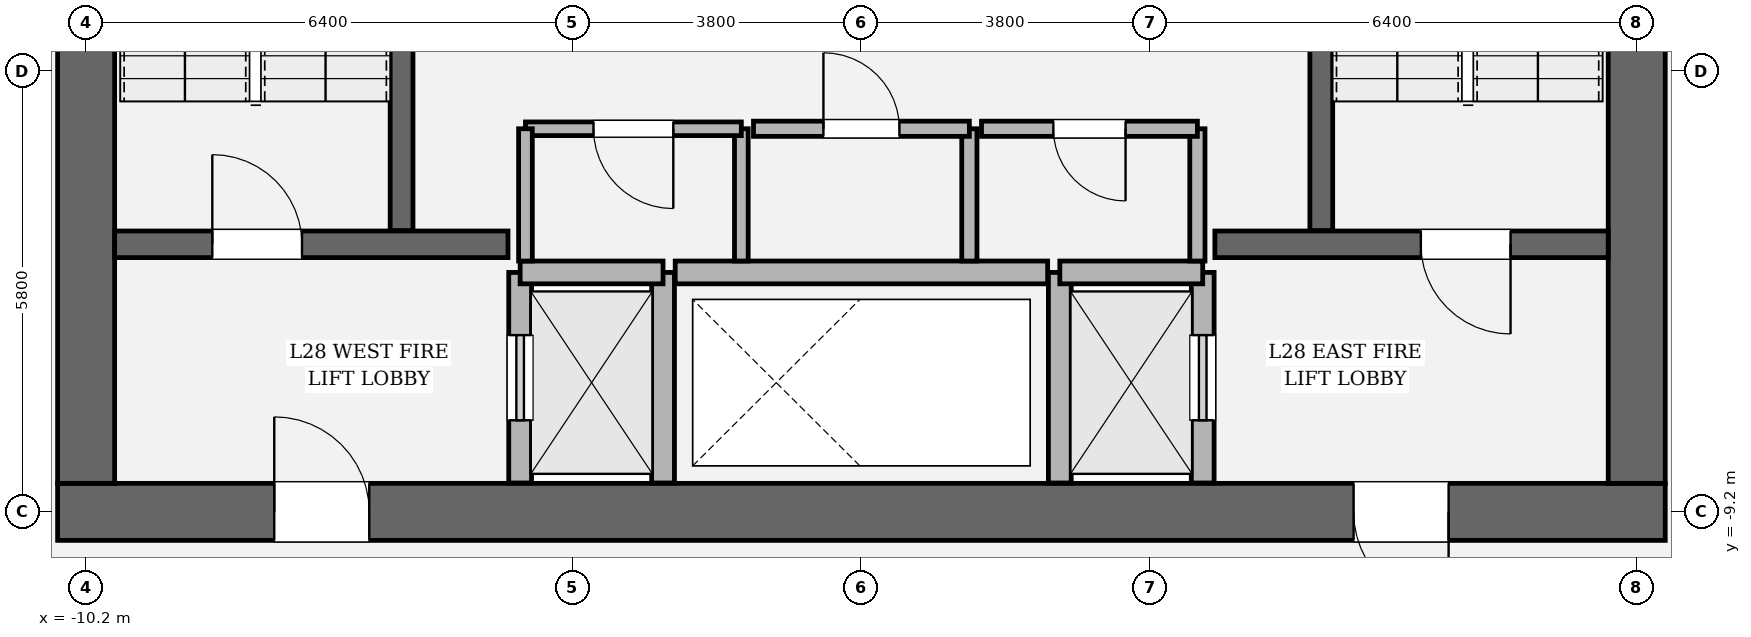
"""IFC4 building model, lengths in metres.
Left out: names, types, materials, properties, quantities, classifications, styles, units other than length and angle.
Written with IfcOpenShell. Run it as: python <this file> out.ifc"""

import sys

from ifc_helpers import new_model, si_unit, direction, frame, frame_2d, origin, place, context, subcontext, project, spatial, rectangle, extrude, element, fill, save


model = new_model("IFC4")
c1 = context("Model", 3, precision=1e-05, world=origin(), true_north=direction((0.0, 1.0)))
c2 = subcontext(c1, "Body", "Model", "MODEL_VIEW")
j1 = project(units=[si_unit("LENGTHUNIT", "METRE"), si_unit("PLANEANGLEUNIT", "RADIAN")], contexts=[c1])
p1 = place(None, origin())
s1 = spatial("IfcSite", under=j1, at=p1, CompositionType="ELEMENT")
p2 = place(p1, origin())
s2 = spatial("IfcBuilding", under=s1, at=p2, CompositionType="ELEMENT")
p3 = place(p2, frame((0.0, 0.0, 121.35)))
s3 = spatial("IfcBuildingStorey", under=s2, at=p3, CompositionType="ELEMENT", Elevation=121.35)
p4 = place(p3, frame((10.575, -9.2, 0.0), z_axis=(0.0, 0.0, 1.0), x_axis=(-1.0, 0.0, 0.0)))
e1 = element("IfcWall", 1, at=p4, inside=s3, PredefinedType="SHEAR", context=c2, shape_type="SweptSolid", body=[
    extrude(rectangle(XDim=21.15, YDim=0.75, at=frame_2d((10.575, 0.0))), origin(), (0.0, 0.0, 1.0), 4.05),
])
p5 = place(p4, frame((2.85, 0.0, 0.0)))
e2 = element("IfcOpeningElement", 2, at=p5, cuts=e1, PredefinedType="OPENING", context=c2, shape_type="SweptSolid", body=[
    extrude(rectangle(XDim=1.25, YDim=2.25, at=frame_2d((0.625, 1.125))), frame((0.0, 0.385, 0.0), z_axis=(0.0, -1.0, 0.0), x_axis=(1.0, 0.0, 0.0)), (0.0, 0.0, 1.0), 0.77),
])
p6 = place(p4, frame((17.05, 0.0, 0.0)))
e3 = element("IfcOpeningElement", 3, at=p6, cuts=e1, PredefinedType="OPENING", context=c2, shape_type="SweptSolid", body=[
    extrude(rectangle(XDim=1.25, YDim=2.25, at=frame_2d((0.625, 1.125))), frame((0.0, 0.385, 0.0), z_axis=(0.0, -1.0, 0.0), x_axis=(1.0, 0.0, 0.0)), (0.0, 0.0, 1.0), 0.77),
])
p7 = place(p3, frame((-10.2, -8.825, 0.0), z_axis=(0.0, 0.0, 1.0), x_axis=(0.0, 1.0, 0.0)))
e4 = element("IfcWall", 4, at=p7, inside=s3, PredefinedType="SHEAR", context=c2, shape_type="SweptSolid", body=[
    extrude(rectangle(XDim=17.65, YDim=0.75, at=frame_2d((8.825, 0.0))), origin(), (0.0, 0.0, 1.0), 4.05),
])
p8 = place(p7, frame((12.615, 0.0, 0.0)))
e5 = element("IfcOpeningElement", 5, at=p8, cuts=e4, PredefinedType="OPENING", context=c2, shape_type="SweptSolid", body=[
    extrude(rectangle(XDim=1.18, YDim=2.2, at=frame_2d((0.59, 1.1))), frame((0.0, 0.385, 0.0), z_axis=(0.0, -1.0, 0.0), x_axis=(1.0, 0.0, 0.0)), (0.0, 0.0, 1.0), 0.77),
])
p9 = place(p3, frame((10.2, 8.825, 0.0), z_axis=(0.0, 0.0, 1.0), x_axis=(0.0, -1.0, 0.0)))
e6 = element("IfcWall", 6, at=p9, inside=s3, PredefinedType="SHEAR", context=c2, shape_type="SweptSolid", body=[
    extrude(rectangle(XDim=17.65, YDim=0.75, at=frame_2d((8.825, 0.0))), origin(), (0.0, 0.0, 1.0), 4.05),
])
p10 = place(p9, frame((3.855, 0.0, 0.0)))
e7 = element("IfcOpeningElement", 7, at=p10, cuts=e6, PredefinedType="OPENING", context=c2, shape_type="SweptSolid", body=[
    extrude(rectangle(XDim=1.18, YDim=2.2, at=frame_2d((0.59, 1.1))), frame((0.0, 0.385, 0.0), z_axis=(0.0, -1.0, 0.0), x_axis=(1.0, 0.0, 0.0)), (0.0, 0.0, 1.0), 0.77),
])
for number, where, z_axis, x_axis in (
    (8, (-6.05, -5.5, 0.0), (0.0, 0.0, 1.0), (0.0, 1.0, 0.0)),
    (9, (6.05, 3.45, 0.0), (0.0, 0.0, 1.0), (0.0, -1.0, 0.0)),
):
    element("IfcWall", number, at=place(p3, frame(where, z_axis=z_axis, x_axis=x_axis)), inside=s3, PredefinedType="SOLIDWALL", context=c2, shape_type="SweptSolid", body=[
        extrude(rectangle(XDim=8.95, YDim=0.3, at=frame_2d((4.475, 0.0))), origin(), (0.0, 0.0, 1.0), 4.05),
    ])
p11 = place(p3, frame((-9.825, -5.68, 0.0), z_axis=(0.0, 0.0, 1.0), x_axis=(1.0, 0.0, 0.0)))
e10 = element("IfcWall", 10, at=p11, inside=s3, PredefinedType="SOLIDWALL", context=c2, shape_type="SweptSolid", body=[
    extrude(rectangle(XDim=5.175, YDim=0.35, at=frame_2d((2.587, 0.0))), origin(), (0.0, 0.0, 1.0), 4.05),
])
p12 = place(p11, frame((1.285, 0.0, 0.0)))
e11 = element("IfcOpeningElement", 11, at=p12, cuts=e10, PredefinedType="OPENING", context=c2, shape_type="SweptSolid", body=[
    extrude(rectangle(XDim=1.18, YDim=2.2, at=frame_2d((0.59, 1.1))), frame((0.0, 0.185, 0.0), z_axis=(0.0, -1.0, 0.0), x_axis=(1.0, 0.0, 0.0)), (0.0, 0.0, 1.0), 0.37),
])
p13 = place(p3, frame((4.65, -5.68, 0.0), z_axis=(0.0, 0.0, 1.0), x_axis=(1.0, 0.0, 0.0)))
e12 = element("IfcWall", 12, at=p13, inside=s3, PredefinedType="SOLIDWALL", context=c2, shape_type="SweptSolid", body=[
    extrude(rectangle(XDim=5.175, YDim=0.35, at=frame_2d((2.587, 0.0))), origin(), (0.0, 0.0, 1.0), 4.05),
])
p14 = place(p13, frame((2.71, 0.0, 0.0)))
e13 = element("IfcOpeningElement", 13, at=p14, cuts=e12, PredefinedType="OPENING", context=c2, shape_type="SweptSolid", body=[
    extrude(rectangle(XDim=1.18, YDim=2.2, at=frame_2d((0.59, 1.1))), frame((0.0, 0.185, 0.0), z_axis=(0.0, -1.0, 0.0), x_axis=(1.0, 0.0, 0.0)), (0.0, 0.0, 1.0), 0.37),
])
p15 = place(p3, frame((-4.49, -8.82, 0.0), z_axis=(0.0, 0.0, 1.0), x_axis=(0.0, 1.0, 0.0)))
e14 = element("IfcWall", 14, at=p15, inside=s3, PredefinedType="SOLIDWALL", context=c2, shape_type="SweptSolid", body=[
    extrude(rectangle(XDim=2.77, YDim=0.3, at=frame_2d((1.385, 0.0))), origin(), (0.0, 0.0, 1.0), 3.73),
])
p16 = place(p15, frame((0.825, 0.0, 0.0)))
e15 = element("IfcOpeningElement", 15, at=p16, cuts=e14, PredefinedType="OPENING", context=c2, shape_type="SweptSolid", body=[
    extrude(rectangle(XDim=1.12, YDim=2.25, at=frame_2d((0.56, 1.125))), frame((0.0, 0.16, 0.0), z_axis=(0.0, -1.0, 0.0), x_axis=(1.0, 0.0, 0.0)), (0.0, 0.0, 1.0), 0.32),
])
p17 = place(p3, frame((-2.61, -8.82, 0.0), z_axis=(0.0, 0.0, 1.0), x_axis=(0.0, 1.0, 0.0)))
e16 = element("IfcWall", 16, at=p17, inside=s3, PredefinedType="SOLIDWALL", context=c2, shape_type="SweptSolid", body=[
    extrude(rectangle(XDim=2.77, YDim=0.3, at=frame_2d((1.385, 0.0))), origin(), (0.0, 0.0, 1.0), 3.73),
])
p18 = place(p3, frame((-4.49, -6.05, 0.0), z_axis=(0.0, 0.0, 1.0), x_axis=(1.0, 0.0, 0.0)))
e17 = element("IfcWall", 17, at=p18, inside=s3, PredefinedType="SOLIDWALL", context=c2, shape_type="SweptSolid", body=[
    extrude(rectangle(XDim=1.88, YDim=0.3, at=frame_2d((0.94, 0.0))), origin(), (0.0, 0.0, 1.0), 3.73),
])
p19 = place(p3, frame((4.49, -8.82, 0.0), z_axis=(0.0, 0.0, 1.0), x_axis=(0.0, 1.0, 0.0)))
e18 = element("IfcWall", 18, at=p19, inside=s3, PredefinedType="SOLIDWALL", context=c2, shape_type="SweptSolid", body=[
    extrude(rectangle(XDim=2.77, YDim=0.3, at=frame_2d((1.385, 0.0))), origin(), (0.0, 0.0, 1.0), 3.73),
])
p20 = place(p19, frame((0.825, 0.0, 0.0)))
e19 = element("IfcOpeningElement", 19, at=p20, cuts=e18, PredefinedType="OPENING", context=c2, shape_type="SweptSolid", body=[
    extrude(rectangle(XDim=1.12, YDim=2.25, at=frame_2d((0.56, 1.125))), frame((0.0, 0.16, 0.0), z_axis=(0.0, -1.0, 0.0), x_axis=(1.0, 0.0, 0.0)), (0.0, 0.0, 1.0), 0.32),
])
p21 = place(p3, frame((2.61, -8.82, 0.0), z_axis=(0.0, 0.0, 1.0), x_axis=(0.0, 1.0, 0.0)))
e20 = element("IfcWall", 20, at=p21, inside=s3, PredefinedType="SOLIDWALL", context=c2, shape_type="SweptSolid", body=[
    extrude(rectangle(XDim=2.77, YDim=0.3, at=frame_2d((1.385, 0.0))), origin(), (0.0, 0.0, 1.0), 3.73),
])
p22 = place(p3, frame((2.61, -6.05, 0.0), z_axis=(0.0, 0.0, 1.0), x_axis=(1.0, 0.0, 0.0)))
e21 = element("IfcWall", 21, at=p22, inside=s3, PredefinedType="SOLIDWALL", context=c2, shape_type="SweptSolid", body=[
    extrude(rectangle(XDim=1.88, YDim=0.3, at=frame_2d((0.94, 0.0))), origin(), (0.0, 0.0, 1.0), 3.73),
])
p23 = place(p3, frame((-2.45, -6.05, 0.0), z_axis=(0.0, 0.0, 1.0), x_axis=(1.0, 0.0, 0.0)))
e22 = element("IfcWall", 22, at=p23, inside=s3, PredefinedType="SOLIDWALL", context=c2, shape_type="SweptSolid", body=[
    extrude(rectangle(XDim=4.9, YDim=0.3, at=frame_2d((2.45, 0.0))), origin(), (0.0, 0.0, 1.0), 3.73),
])
p24 = place(p3, frame((-1.58, -5.9, 0.0), z_axis=(0.0, 0.0, 1.0), x_axis=(0.0, 1.0, 0.0)))
e23 = element("IfcWall", 23, at=p24, inside=s3, PredefinedType="PARTITIONING", context=c2, shape_type="SweptSolid", body=[
    extrude(rectangle(XDim=1.74, YDim=0.18, at=frame_2d((0.87, 0.0))), origin(), (0.0, 0.0, 1.0), 3.73),
])
p25 = place(p3, frame((-1.58, -4.16, 0.0), z_axis=(0.0, 0.0, 1.0), x_axis=(-1.0, 0.0, 0.0)))
e24 = element("IfcWall", 24, at=p25, inside=s3, PredefinedType="PARTITIONING", context=c2, shape_type="SweptSolid", body=[
    extrude(rectangle(XDim=2.84, YDim=0.18, at=frame_2d((1.42, 0.0))), origin(), (0.0, 0.0, 1.0), 3.73),
])
p26 = place(p25, frame((0.895, 0.0, 0.0)))
e25 = element("IfcOpeningElement", 25, at=p26, cuts=e24, PredefinedType="OPENING", context=c2, shape_type="SweptSolid", body=[
    extrude(rectangle(XDim=1.05, YDim=2.2, at=frame_2d((0.525, 1.1))), frame((0.0, 0.1, 0.0), z_axis=(0.0, -1.0, 0.0), x_axis=(1.0, 0.0, 0.0)), (0.0, 0.0, 1.0), 0.2),
])
p27 = place(p3, frame((-4.42, -4.16, 0.0), z_axis=(0.0, 0.0, 1.0), x_axis=(0.0, -1.0, 0.0)))
e26 = element("IfcWall", 26, at=p27, inside=s3, PredefinedType="PARTITIONING", context=c2, shape_type="SweptSolid", body=[
    extrude(rectangle(XDim=1.74, YDim=0.18, at=frame_2d((0.87, 0.0))), origin(), (0.0, 0.0, 1.0), 3.73),
])
p28 = place(p3, frame((1.42, -5.9, 0.0), z_axis=(0.0, 0.0, 1.0), x_axis=(0.0, 1.0, 0.0)))
e27 = element("IfcWall", 27, at=p28, inside=s3, PredefinedType="SOLIDWALL", context=c2, shape_type="SweptSolid", body=[
    extrude(rectangle(XDim=1.74, YDim=0.2, at=frame_2d((0.87, 0.0))), origin(), (0.0, 0.0, 1.0), 3.73),
])
p29 = place(p3, frame((1.42, -4.16, 0.0), z_axis=(0.0, 0.0, 1.0), x_axis=(-1.0, 0.0, 0.0)))
e28 = element("IfcWall", 28, at=p29, inside=s3, PredefinedType="SOLIDWALL", context=c2, shape_type="SweptSolid", body=[
    extrude(rectangle(XDim=2.84, YDim=0.2, at=frame_2d((1.42, 0.0))), origin(), (0.0, 0.0, 1.0), 3.73),
])
p30 = place(p29, frame((0.92, 0.0, 0.0)))
e29 = element("IfcOpeningElement", 29, at=p30, cuts=e28, PredefinedType="OPENING", context=c2, shape_type="SweptSolid", body=[
    extrude(rectangle(XDim=1.0, YDim=2.15, at=frame_2d((0.5, 1.075))), frame((0.0, 0.11, 0.0), z_axis=(0.0, -1.0, 0.0), x_axis=(1.0, 0.0, 0.0)), (0.0, 0.0, 1.0), 0.22),
])
p31 = place(p3, frame((4.42, -5.9, 0.0), z_axis=(0.0, 0.0, 1.0), x_axis=(0.0, 1.0, 0.0)))
e30 = element("IfcWall", 30, at=p31, inside=s3, PredefinedType="SOLIDWALL", context=c2, shape_type="SweptSolid", body=[
    extrude(rectangle(XDim=1.74, YDim=0.2, at=frame_2d((0.87, 0.0))), origin(), (0.0, 0.0, 1.0), 3.73),
])
p32 = place(p3, frame((4.42, -4.16, 0.0), z_axis=(0.0, 0.0, 1.0), x_axis=(-1.0, 0.0, 0.0)))
e31 = element("IfcWall", 31, at=p32, inside=s3, PredefinedType="SOLIDWALL", context=c2, shape_type="SweptSolid", body=[
    extrude(rectangle(XDim=2.84, YDim=0.2, at=frame_2d((1.42, 0.0))), origin(), (0.0, 0.0, 1.0), 3.73),
])
p33 = place(p32, frame((0.945, 0.0, 0.0)))
e32 = element("IfcOpeningElement", 32, at=p33, cuts=e31, PredefinedType="OPENING", context=c2, shape_type="SweptSolid", body=[
    extrude(rectangle(XDim=0.95, YDim=2.15, at=frame_2d((0.475, 1.075))), frame((0.0, 0.11, 0.0), z_axis=(0.0, -1.0, 0.0), x_axis=(1.0, 0.0, 0.0)), (0.0, 0.0, 1.0), 0.22),
])
p34 = place(p12, origin())
e33 = element("IfcDoor", 33, at=p34, inside=s3, OperationType="SINGLE_SWING_LEFT", PredefinedType="DOOR", context=c2, shape_type="SweptSolid", body=[
    extrude(rectangle(XDim=1.18, YDim=2.2, at=frame_2d((0.59, 1.1))), frame((0.0, 0.025, 0.0), z_axis=(0.0, -1.0, 0.0), x_axis=(1.0, 0.0, 0.0)), (0.0, 0.0, 1.0), 0.05),
])
fill(e11, e33)
p35 = place(p14, origin())
e34 = element("IfcDoor", 34, at=p35, inside=s3, OperationType="SINGLE_SWING_RIGHT", PredefinedType="DOOR", context=c2, shape_type="SweptSolid", body=[
    extrude(rectangle(XDim=1.18, YDim=2.2, at=frame_2d((0.59, 1.1))), frame((0.0, 0.025, 0.0), z_axis=(0.0, -1.0, 0.0), x_axis=(1.0, 0.0, 0.0)), (0.0, 0.0, 1.0), 0.05),
])
fill(e13, e34)
p36 = place(p5, origin())
e35 = element("IfcDoor", 35, at=p36, inside=s3, OperationType="SINGLE_SWING_LEFT", PredefinedType="DOOR", context=c2, shape_type="SweptSolid", body=[
    extrude(rectangle(XDim=1.25, YDim=2.25, at=frame_2d((0.625, 1.125))), frame((0.0, 0.025, 0.0), z_axis=(0.0, -1.0, 0.0), x_axis=(1.0, 0.0, 0.0)), (0.0, 0.0, 1.0), 0.05),
])
fill(e2, e35)
p37 = place(p6, origin())
e36 = element("IfcDoor", 36, at=p37, inside=s3, OperationType="SINGLE_SWING_RIGHT", PredefinedType="DOOR", context=c2, shape_type="SweptSolid", body=[
    extrude(rectangle(XDim=1.25, YDim=2.25, at=frame_2d((0.625, 1.125))), frame((0.0, 0.025, 0.0), z_axis=(0.0, -1.0, 0.0), x_axis=(1.0, 0.0, 0.0)), (0.0, 0.0, 1.0), 0.05),
])
fill(e3, e36)
p38 = place(p16, origin())
e37 = element("IfcDoor", 37, at=p38, inside=s3, OperationType="SLIDING_TO_LEFT", PredefinedType="DOOR", context=c2, shape_type="SweptSolid", body=[
    extrude(rectangle(XDim=1.12, YDim=2.25, at=frame_2d((0.56, 1.125))), frame((0.0, 0.025, 0.0), z_axis=(0.0, -1.0, 0.0), x_axis=(1.0, 0.0, 0.0)), (0.0, 0.0, 1.0), 0.05),
])
fill(e15, e37)
p39 = place(p20, origin())
e38 = element("IfcDoor", 38, at=p39, inside=s3, OperationType="SLIDING_TO_RIGHT", PredefinedType="DOOR", context=c2, shape_type="SweptSolid", body=[
    extrude(rectangle(XDim=1.12, YDim=2.25, at=frame_2d((0.56, 1.125))), frame((0.0, 0.025, 0.0), z_axis=(0.0, -1.0, 0.0), x_axis=(1.0, 0.0, 0.0)), (0.0, 0.0, 1.0), 0.05),
])
fill(e19, e38)
p40 = place(p26, origin())
e39 = element("IfcDoor", 39, at=p40, inside=s3, OperationType="SINGLE_SWING_LEFT", PredefinedType="DOOR", context=c2, shape_type="SweptSolid", body=[
    extrude(rectangle(XDim=1.05, YDim=2.2, at=frame_2d((0.525, 1.1))), frame((0.0, 0.025, 0.0), z_axis=(0.0, -1.0, 0.0), x_axis=(1.0, 0.0, 0.0)), (0.0, 0.0, 1.0), 0.05),
])
fill(e25, e39)
p41 = place(p30, origin())
e40 = element("IfcDoor", 40, at=p41, inside=s3, OperationType="SINGLE_SWING_RIGHT", PredefinedType="DOOR", context=c2, shape_type="SweptSolid", body=[
    extrude(rectangle(XDim=1.0, YDim=2.15, at=frame_2d((0.5, 1.075))), frame((0.0, 0.025, 0.0), z_axis=(0.0, -1.0, 0.0), x_axis=(1.0, 0.0, 0.0)), (0.0, 0.0, 1.0), 0.05),
])
fill(e29, e40)
p42 = place(p33, origin())
e41 = element("IfcDoor", 41, at=p42, inside=s3, OperationType="SINGLE_SWING_LEFT", PredefinedType="DOOR", context=c2, shape_type="SweptSolid", body=[
    extrude(rectangle(XDim=0.95, YDim=2.15, at=frame_2d((0.475, 1.075))), frame((0.0, 0.025, 0.0), z_axis=(0.0, -1.0, 0.0), x_axis=(1.0, 0.0, 0.0)), (0.0, 0.0, 1.0), 0.05),
])
fill(e32, e41)
save(model, sys.argv[1])
